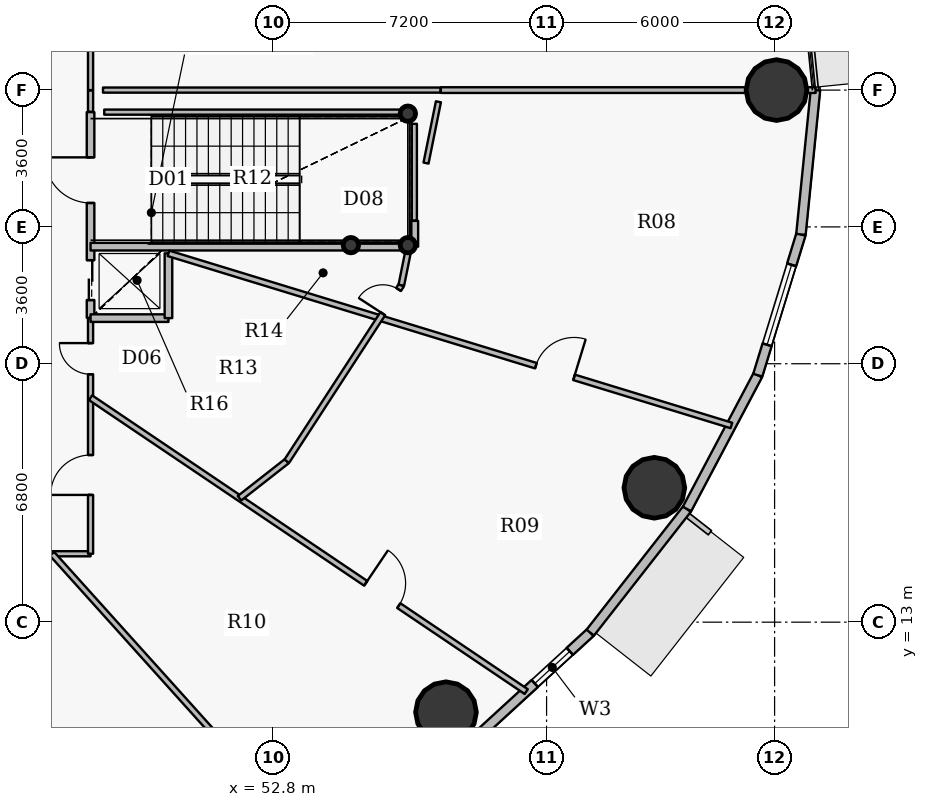
"""IFC4 building model, lengths in metres.
Left out: names, types, materials, properties, quantities, classifications, styles, units other than length and angle.
Written with IfcOpenShell. Run it as: python <this file> out.ifc"""

import sys

from ifc_helpers import new_model, si_unit, direction, frame, frame_2d, origin, origin_2d, place, context, subcontext, project, spatial, rectangle, hollow_circle, extrude, source, transform, mapped, element, fill, save


model = new_model("IFC4")
c1 = context("Model", 3, precision=1e-05, world=origin(), true_north=direction((0.0, 1.0)))
c2 = subcontext(c1, "Body", "Model", "MODEL_VIEW")
j1 = project(units=[si_unit("LENGTHUNIT", "METRE"), si_unit("PLANEANGLEUNIT", "RADIAN")], contexts=[c1])
p1 = place(None, origin())
s1 = spatial("IfcSite", under=j1, at=p1, CompositionType="ELEMENT")
p2 = place(p1, origin())
s2 = spatial("IfcBuilding", under=s1, at=p2, CompositionType="ELEMENT")
p3 = place(p2, frame((0.0, 0.0, 40.8)))
s3 = spatial("IfcBuildingStorey", under=s2, at=p3, CompositionType="ELEMENT", Elevation=40.8)
for number, where, z_axis, x_axis in (
    (1, (56.35, 26.38, 0.0), (0.0, 0.0, 1.0), (1.0, 0.0, 0.0)),
    (2, (56.35, 22.92, 0.0), (0.0, 0.0, 1.0), (1.0, 0.0, 0.0)),
    (3, (54.85, 22.92, 0.0), (0.0, 0.0, 1.0), (1.0, 0.0, 0.0)),
):
    element("IfcColumn", number, at=place(p3, frame(where, z_axis=z_axis, x_axis=x_axis)), inside=s3, PredefinedType="COLUMN", context=c2, shape_type="SweptSolid", body=[
        extrude(hollow_circle(Radius=0.203, WallThickness=0.016, at=origin_2d()), origin(), (0.0, 0.0, 1.0), 4.2),
    ])
for number, where, z_axis, x_axis in (
    (4, (66.05, 27.0, 0.0), (0.0, 0.0, 1.0), (1.0, 0.0, 0.0)),
    (5, (57.353, 10.631, 0.0), (0.0, 0.0, 1.0), (1.0, 0.0, 0.0)),
    (6, (62.835, 16.536, 0.0), (0.0, 0.0, 1.0), (1.0, 0.0, 0.0)),
):
    element("IfcColumn", number, at=place(p3, frame(where, z_axis=z_axis, x_axis=x_axis)), inside=s3, PredefinedType="COLUMN", context=c2, shape_type="SweptSolid", body=[
        extrude(hollow_circle(Radius=0.8, WallThickness=0.045, at=origin_2d()), origin(), (0.0, 0.0, 1.0), 4.2),
    ])
p4 = place(p3, frame((61.15, 12.725, 0.0), z_axis=(0.0, 0.0, 1.0), x_axis=(-0.737116376281, -0.67576582321, 0.0)))
e7 = element("IfcWall", 7, at=p4, inside=s3, PredefinedType="SOLIDWALL", context=c2, shape_type="SweptSolid", body=[
    extrude(rectangle(XDim=4.294, YDim=0.25, at=frame_2d((2.147, 0.0))), origin(), (0.0, 0.0, 1.0), 3.95),
])
p5 = place(p4, frame((0.731, 0.0, 0.9)))
e8 = element("IfcOpeningElement", 8, at=p5, cuts=e7, PredefinedType="OPENING", context=c2, shape_type="SweptSolid", body=[
    extrude(rectangle(XDim=1.25, YDim=1.65, at=origin_2d()), frame((0.625, 0.135, 0.825), z_axis=(0.0, -1.0, 0.0), x_axis=(1.0, 0.0, 0.0)), (0.0, 0.0, 1.0), 0.27),
])
p6 = place(p3, frame((63.695, 15.977, 0.0), z_axis=(0.0, 0.0, 1.0), x_axis=(-0.616295508253, -0.787514981767, 0.0)))
e9 = element("IfcWall", 9, at=p6, inside=s3, PredefinedType="SOLIDWALL", context=c2, shape_type="SweptSolid", body=[
    extrude(rectangle(XDim=4.129, YDim=0.25, at=frame_2d((2.065, 0.0))), origin(), (0.0, 0.0, 1.0), 3.95),
])
p7 = place(p3, frame((65.558, 19.499, 0.0), z_axis=(0.0, 0.0, 1.0), x_axis=(-0.467662443071, -0.883907144072, 0.0)))
e10 = element("IfcWall", 10, at=p7, inside=s3, PredefinedType="SOLIDWALL", context=c2, shape_type="SweptSolid", body=[
    extrude(rectangle(XDim=3.984, YDim=0.25, at=frame_2d((1.992, 0.0))), origin(), (0.0, 0.0, 1.0), 3.95),
])
p8 = place(p3, frame((66.693, 23.203, 0.0), z_axis=(0.0, 0.0, 1.0), x_axis=(-0.293111631758, -0.956078224482, 0.0)))
e11 = element("IfcWall", 11, at=p8, inside=s3, PredefinedType="SOLIDWALL", context=c2, shape_type="SweptSolid", body=[
    extrude(rectangle(XDim=3.875, YDim=0.25, at=frame_2d((1.938, 0.0))), origin(), (0.0, 0.0, 1.0), 3.95),
])
p9 = place(p8, frame((0.837, 0.0, 0.9)))
e12 = element("IfcOpeningElement", 12, at=p9, cuts=e11, PredefinedType="OPENING", context=c2, shape_type="SweptSolid", body=[
    extrude(rectangle(XDim=2.2, YDim=2.0, at=origin_2d()), frame((1.1, 0.135, 1.0), z_axis=(0.0, -1.0, 0.0), x_axis=(1.0, 0.0, 0.0)), (0.0, 0.0, 1.0), 0.27),
])
p10 = place(p3, frame((67.075, 27.0, 0.0), z_axis=(0.0, 0.0, 1.0), x_axis=(-0.099997795174, -0.994987658698, 0.0)))
e13 = element("IfcWall", 13, at=p10, inside=s3, PredefinedType="SOLIDWALL", context=c2, shape_type="SweptSolid", body=[
    extrude(rectangle(XDim=3.816, YDim=0.25, at=frame_2d((1.908, 0.0))), origin(), (0.0, 0.0, 1.0), 3.95),
])
p11 = place(p3, frame((46.05, 14.8, 0.0), z_axis=(0.0, 0.0, 1.0), x_axis=(1.0, 0.0, 0.0)))
e14 = element("IfcWall", 14, at=p11, inside=s3, PredefinedType="PARTITIONING", context=c2, shape_type="SweptSolid", body=[
    extrude(rectangle(XDim=1.95, YDim=0.135, at=frame_2d((0.975, 0.0))), origin(), (0.0, 0.0, 1.0), 3.95),
])
p12 = place(p3, frame((46.985, 14.8, 0.0), z_axis=(0.0, 0.0, 1.0), x_axis=(0.669133664768, -0.743142071662, 0.0)))
e15 = element("IfcWall", 15, at=p12, inside=s3, PredefinedType="PARTITIONING", context=c2, shape_type="SweptSolid", body=[
    extrude(rectangle(XDim=10.299, YDim=0.15, at=frame_2d((5.149, 0.0))), origin(), (0.0, 0.0, 1.0), 3.335),
])
p13 = place(p3, frame((48.0, 14.8, 0.0), z_axis=(0.0, 0.0, 1.0), x_axis=(0.0, 1.0, 0.0)))
e16 = element("IfcWall", 16, at=p13, inside=s3, PredefinedType="PARTITIONING", context=c2, shape_type="SweptSolid", body=[
    extrude(rectangle(XDim=6.2, YDim=0.135, at=frame_2d((3.1, 0.0))), origin(), (0.0, 0.0, 1.0), 3.285),
])
p14 = place(p13, frame((1.548, 0.0, 0.0)))
e17 = element("IfcOpeningElement", 17, at=p14, cuts=e16, PredefinedType="OPENING", context=c2, shape_type="SweptSolid", body=[
    extrude(rectangle(XDim=1.05, YDim=2.15, at=origin_2d()), frame((0.525, 0.078, 1.075), z_axis=(0.0, -1.0, 0.0), x_axis=(1.0, 0.0, 0.0)), (0.0, 0.0, 1.0), 0.155),
])
p15 = place(p13, frame((4.723, 0.0, 0.0)))
e18 = element("IfcOpeningElement", 18, at=p15, cuts=e16, PredefinedType="OPENING", context=c2, shape_type="SweptSolid", body=[
    extrude(rectangle(XDim=0.82, YDim=2.1, at=origin_2d()), frame((0.41, 0.078, 1.05), z_axis=(0.0, -1.0, 0.0), x_axis=(1.0, 0.0, 0.0)), (0.0, 0.0, 1.0), 0.155),
])
p16 = place(p3, frame((48.0, 18.906, 0.0), z_axis=(0.0, 0.0, 1.0), x_axis=(0.829036724814, -0.559194160296, 0.0)))
e19 = element("IfcWall", 19, at=p16, inside=s3, PredefinedType="PARTITIONING", context=c2, shape_type="SweptSolid", body=[
    extrude(rectangle(XDim=13.828, YDim=0.15, at=frame_2d((6.914, 0.0))), origin(), (0.0, 0.0, 1.0), 3.335),
])
p17 = place(p16, frame((8.733, 0.0, 0.0)))
e20 = element("IfcOpeningElement", 20, at=p17, cuts=e19, PredefinedType="OPENING", context=c2, shape_type="SweptSolid", body=[
    extrude(rectangle(XDim=1.05, YDim=2.15, at=origin_2d()), frame((0.525, 0.085, 1.075), z_axis=(0.0, -1.0, 0.0), x_axis=(1.0, 0.0, 0.0)), (0.0, 0.0, 1.0), 0.17),
])
p18 = place(p3, frame((48.0, 21.01, 0.0), z_axis=(0.0, 0.0, 1.0), x_axis=(0.0, 1.0, 0.0)))
e21 = element("IfcWall", 21, at=p18, inside=s3, PredefinedType="PARTITIONING", context=c2, shape_type="SweptSolid", body=[
    extrude(rectangle(XDim=5.41, YDim=0.2, at=frame_2d((2.705, 0.0))), origin(), (0.0, 0.0, 1.0), 3.285),
])
p19 = place(p18, frame((3.02, 0.0, 0.0)))
e22 = element("IfcOpeningElement", 22, at=p19, cuts=e21, PredefinedType="OPENING", context=c2, shape_type="SweptSolid", body=[
    extrude(rectangle(XDim=1.2, YDim=2.15, at=origin_2d()), frame((0.6, 0.11, 1.075), z_axis=(0.0, -1.0, 0.0), x_axis=(1.0, 0.0, 0.0)), (0.0, 0.0, 1.0), 0.22),
])
p20 = place(p18, frame((0.465, 0.0, 0.0)))
e23 = element("IfcOpeningElement", 23, at=p20, cuts=e21, PredefinedType="OPENING", context=c2, shape_type="SweptSolid", body=[
    extrude(rectangle(XDim=1.05, YDim=2.15, at=origin_2d()), frame((0.525, 0.11, 1.075), z_axis=(0.0, -1.0, 0.0), x_axis=(1.0, 0.0, 0.0)), (0.0, 0.0, 1.0), 0.22),
])
p21 = place(p3, frame((48.0, 21.0, 0.0), z_axis=(0.0, 0.0, 1.0), x_axis=(1.0, 0.0, 0.0)))
e24 = element("IfcWall", 24, at=p21, inside=s3, PredefinedType="PARTITIONING", context=c2, shape_type="SweptSolid", body=[
    extrude(rectangle(XDim=2.05, YDim=0.2, at=frame_2d((1.025, 0.0))), origin(), (0.0, 0.0, 1.0), 3.95),
])
p22 = place(p3, frame((48.0, 22.88, 0.0), z_axis=(0.0, 0.0, 1.0), x_axis=(1.0, 0.0, 0.0)))
e25 = element("IfcWall", 25, at=p22, inside=s3, PredefinedType="PARTITIONING", context=c2, shape_type="SweptSolid", body=[
    extrude(rectangle(XDim=8.383, YDim=0.2, at=frame_2d((4.191, 0.0))), origin(), (0.0, 0.0, 1.0), 3.95),
])
p23 = place(p3, frame((48.0, 27.0, 0.0), z_axis=(0.0, 0.0, 1.0), x_axis=(0.0, 1.0, 0.0)))
e26 = element("IfcWall", 26, at=p23, inside=s3, PredefinedType="PARTITIONING", context=c2, shape_type="SweptSolid", body=[
    extrude(rectangle(XDim=14.2, YDim=0.135, at=frame_2d((7.1, 0.0))), origin(), (0.0, 0.0, 1.0), 3.285),
])
p24 = place(p23, frame((2.959, 0.0, 0.0)))
e27 = element("IfcOpeningElement", 27, at=p24, cuts=e26, PredefinedType="OPENING", context=c2, shape_type="SweptSolid", body=[
    extrude(rectangle(XDim=1.05, YDim=2.15, at=origin_2d()), frame((0.525, 0.078, 1.075), z_axis=(0.0, -1.0, 0.0), x_axis=(1.0, 0.0, 0.0)), (0.0, 0.0, 1.0), 0.155),
])
p25 = place(p23, frame((10.019, 0.0, 0.0)))
e28 = element("IfcOpeningElement", 28, at=p25, cuts=e26, PredefinedType="OPENING", context=c2, shape_type="SweptSolid", body=[
    extrude(rectangle(XDim=1.05, YDim=2.15, at=origin_2d()), frame((0.525, 0.078, 1.075), z_axis=(0.0, -1.0, 0.0), x_axis=(1.0, 0.0, 0.0)), (0.0, 0.0, 1.0), 0.155),
])
p26 = place(p3, frame((50.05, 21.0, 0.0), z_axis=(0.0, 0.0, 1.0), x_axis=(0.0, 1.0, 0.0)))
e29 = element("IfcWall", 29, at=p26, inside=s3, PredefinedType="PARTITIONING", context=c2, shape_type="SweptSolid", body=[
    extrude(rectangle(XDim=1.705, YDim=0.2, at=frame_2d((0.852, 0.0))), origin(), (0.0, 0.0, 1.0), 3.285),
])
p27 = place(p3, frame((50.05, 22.705, 0.0), z_axis=(0.0, 0.0, 1.0), x_axis=(0.9563012706, -0.292383104588, 0.0)))
e30 = element("IfcWall", 30, at=p27, inside=s3, PredefinedType="PARTITIONING", context=c2, shape_type="SweptSolid", body=[
    extrude(rectangle(XDim=15.49, YDim=0.15, at=frame_2d((7.745, 0.0))), origin(), (0.0, 0.0, 1.0), 3.335),
])
p28 = place(p27, frame((10.11, 0.0, 0.0)))
e31 = element("IfcOpeningElement", 31, at=p28, cuts=e30, PredefinedType="OPENING", context=c2, shape_type="SweptSolid", body=[
    extrude(rectangle(XDim=1.05, YDim=2.15, at=origin_2d()), frame((0.525, 0.085, 1.075), z_axis=(0.0, -1.0, 0.0), x_axis=(1.0, 0.0, 0.0)), (0.0, 0.0, 1.0), 0.17),
])
p29 = place(p3, frame((51.92, 16.262, 0.0), z_axis=(0.0, 0.0, 1.0), x_axis=(0.787325584525, 0.616537447324, 0.0)))
e32 = element("IfcWall", 32, at=p29, inside=s3, PredefinedType="PARTITIONING", context=c2, shape_type="SweptSolid", body=[
    extrude(rectangle(XDim=1.58, YDim=0.15, at=frame_2d((0.79, 0.0))), origin(), (0.0, 0.0, 1.0), 3.95),
])
p30 = place(p3, frame((53.164, 17.236, 0.0), z_axis=(0.0, 0.0, 1.0), x_axis=(0.545448002944, 0.838144662981, 0.0)))
e33 = element("IfcWall", 33, at=p30, inside=s3, PredefinedType="PARTITIONING", context=c2, shape_type="SweptSolid", body=[
    extrude(rectangle(XDim=5.525, YDim=0.15, at=frame_2d((2.763, 0.0))), origin(), (0.0, 0.0, 1.0), 3.285),
])
p31 = place(p30, frame((4.631, 0.0, 0.0)))
e34 = element("IfcOpeningElement", 34, at=p31, cuts=e33, PredefinedType="OPENING", context=c2, shape_type="SweptSolid", body=[
    extrude(rectangle(XDim=0.76, YDim=2.1, at=origin_2d()), frame((0.38, 0.085, 1.05), z_axis=(0.0, -1.0, 0.0), x_axis=(1.0, 0.0, 0.0)), (0.0, 0.0, 1.0), 0.17),
])
p32 = place(p3, frame((56.178, 21.866, 0.0), z_axis=(0.0, 0.0, 1.0), x_axis=(0.198113758035, 0.980179034094, 0.0)))
e35 = element("IfcWall", 35, at=p32, inside=s3, PredefinedType="PARTITIONING", context=c2, shape_type="SweptSolid", body=[
    extrude(rectangle(XDim=1.034, YDim=0.15, at=frame_2d((0.517, 0.0))), origin(), (0.0, 0.0, 1.0), 3.95),
])
p33 = place(p3, frame((56.52, 22.88, 0.0), z_axis=(0.0, 0.0, 1.0), x_axis=(0.0, 1.0, 0.0)))
e36 = element("IfcWall", 36, at=p33, inside=s3, PredefinedType="PARTITIONING", context=c2, shape_type="SweptSolid", body=[
    extrude(rectangle(XDim=0.679, YDim=0.2, at=frame_2d((0.34, 0.0))), origin(), (0.0, 0.0, 1.0), 3.95),
])
p34 = place(p3, frame((57.216, 27.0, 0.0), z_axis=(0.0, 0.0, 1.0), x_axis=(1.0, 0.0, 0.0)))
e37 = element("IfcWall", 37, at=p34, inside=s3, PredefinedType="PARTITIONING", context=c2, shape_type="SweptSolid", body=[
    extrude(rectangle(XDim=9.864, YDim=0.15, at=frame_2d((4.932, 0.0))), origin(), (0.0, 0.0, 1.0), 3.285),
])
p35 = place(p3, frame((48.36, 26.42, 0.0), z_axis=(0.0, 0.0, 1.0), x_axis=(1.0, 0.0, 0.0)))
e38 = element("IfcWall", 38, at=p35, inside=s3, PredefinedType="PARTITIONING", context=c2, shape_type="SweptSolid", body=[
    extrude(rectangle(XDim=8.16, YDim=0.135, at=frame_2d((4.08, 0.0))), origin(), (0.0, 0.0, 1.0), 3.95),
])
p36 = place(p3, frame((56.52, 26.113, 0.0), z_axis=(0.0, 0.0, 1.0), x_axis=(0.0, -1.0, 0.0)))
e39 = element("IfcWall", 39, at=p36, inside=s3, PredefinedType="PARTITIONING", context=c2, shape_type="SweptSolid", body=[
    extrude(rectangle(XDim=2.543, YDim=0.135, at=frame_2d((1.272, 0.0))), origin(), (0.0, 0.0, 1.0), 3.95),
])
p37 = place(p3, frame((48.0, 26.99, 0.0), z_axis=(0.0, 0.0, 1.0), x_axis=(0.0, -1.0, 0.0)))
e40 = element("IfcWall", 40, at=p37, inside=s3, PredefinedType="PARTITIONING", context=c2, shape_type="SweptSolid", body=[
    extrude(rectangle(XDim=0.56, YDim=0.135, at=frame_2d((0.28, 0.0))), origin(), (0.0, 0.0, 1.0), 3.285),
])
p38 = place(p3, frame((57.206, 27.0, 0.0), z_axis=(0.0, 0.0, 1.0), x_axis=(-1.0, 0.0, 0.0)))
e41 = element("IfcWall", 41, at=p38, inside=s3, PredefinedType="PARTITIONING", context=c2, shape_type="SweptSolid", body=[
    extrude(rectangle(XDim=8.879, YDim=0.135, at=frame_2d((4.439, 0.0))), origin(), (0.0, 0.0, 1.0), 3.285),
])
p39 = place(p3, frame((56.827, 25.079, 0.0), z_axis=(0.0, 0.0, 1.0), x_axis=(0.198340845342, 0.980133107832, 0.0)))
e42 = element("IfcWall", 42, at=p39, inside=s3, PredefinedType="PARTITIONING", context=c2, shape_type="SweptSolid", body=[
    extrude(rectangle(XDim=1.646, YDim=0.135, at=frame_2d((0.823, 0.0))), origin(), (0.0, 0.0, 1.0), 3.95),
])
m1 = source(origin(), c2, "Body", "SweptSolid", [
    extrude(rectangle(XDim=1.25, YDim=1.65, at=origin_2d()), frame((0.625, 0.03, 0.825), z_axis=(0.0, -1.0, 0.0), x_axis=(1.0, 0.0, 0.0)), (0.0, 0.0, 1.0), 0.06),
])
p40 = place(p5, origin())
e43 = element("IfcWindow", 43, at=p40, inside=s3, PartitioningType="SINGLE_PANEL", PredefinedType="WINDOW", context=c2, shape_type="MappedRepresentation", body=[
    mapped(m1, transform((0.0, 0.0, 0.0), x_axis=(1.0, 0.0, 0.0), y_axis=(0.0, 1.0, 0.0), z_axis=(0.0, 0.0, 1.0), scale=1.0)),
])
fill(e8, e43)
m2 = source(origin(), c2, "Body", "SweptSolid", [
    extrude(rectangle(XDim=2.2, YDim=2.0, at=origin_2d()), frame((1.1, 0.03, 1.0), z_axis=(0.0, -1.0, 0.0), x_axis=(1.0, 0.0, 0.0)), (0.0, 0.0, 1.0), 0.06),
])
p41 = place(p9, origin())
e44 = element("IfcWindow", 44, at=p41, inside=s3, PartitioningType="TRIPLE_PANEL_VERTICAL", PredefinedType="WINDOW", context=c2, shape_type="MappedRepresentation", body=[
    mapped(m2, transform((0.0, 0.0, 0.0), x_axis=(1.0, 0.0, 0.0), y_axis=(0.0, 1.0, 0.0), z_axis=(0.0, 0.0, 1.0), scale=1.0)),
])
fill(e12, e44)
m3 = source(origin(), c2, "Body", "SweptSolid", [
    extrude(rectangle(XDim=1.2, YDim=2.15, at=origin_2d()), frame((0.6, 0.025, 1.075), z_axis=(0.0, -1.0, 0.0), x_axis=(1.0, 0.0, 0.0)), (0.0, 0.0, 1.0), 0.05),
])
p42 = place(p19, origin())
e45 = element("IfcDoor", 45, at=p42, inside=s3, OperationType="SINGLE_SWING_RIGHT", PredefinedType="DOOR", context=c2, shape_type="MappedRepresentation", body=[
    mapped(m3, transform((0.0, 0.0, 0.0), x_axis=(1.0, 0.0, 0.0), y_axis=(0.0, 1.0, 0.0), z_axis=(0.0, 0.0, 1.0), scale=1.0)),
])
fill(e22, e45)
m4 = source(origin(), c2, "Body", "SweptSolid", [
    extrude(rectangle(XDim=1.05, YDim=2.15, at=origin_2d()), frame((0.525, 0.025, 1.075), z_axis=(0.0, -1.0, 0.0), x_axis=(1.0, 0.0, 0.0)), (0.0, 0.0, 1.0), 0.05),
])
p43 = place(p20, origin())
e46 = element("IfcDoor", 46, at=p43, inside=s3, OperationType="DOUBLE_DOOR_SLIDING", PredefinedType="USERDEFINED", context=c2, shape_type="MappedRepresentation", body=[
    mapped(m4, transform((0.0, 0.0, 0.0), x_axis=(1.0, 0.0, 0.0), y_axis=(0.0, 1.0, 0.0), z_axis=(0.0, 0.0, 1.0), scale=1.0)),
])
fill(e23, e46)
m5 = source(origin(), c2, "Body", "SweptSolid", [
    extrude(rectangle(XDim=1.05, YDim=2.15, at=origin_2d()), frame((0.525, 0.025, 1.075), z_axis=(0.0, -1.0, 0.0), x_axis=(1.0, 0.0, 0.0)), (0.0, 0.0, 1.0), 0.05),
])
p44 = place(p14, origin())
e47 = element("IfcDoor", 47, at=p44, inside=s3, OperationType="SINGLE_SWING_LEFT", PredefinedType="DOOR", context=c2, shape_type="MappedRepresentation", body=[
    mapped(m5, transform((0.0, 0.0, 0.0), x_axis=(1.0, 0.0, 0.0), y_axis=(0.0, 1.0, 0.0), z_axis=(0.0, 0.0, 1.0), scale=1.0)),
])
fill(e17, e47)
m6 = source(origin(), c2, "Body", "SweptSolid", [
    extrude(rectangle(XDim=0.82, YDim=2.1, at=origin_2d()), frame((0.41, 0.025, 1.05), z_axis=(0.0, -1.0, 0.0), x_axis=(1.0, 0.0, 0.0)), (0.0, 0.0, 1.0), 0.05),
])
p45 = place(p15, origin())
e48 = element("IfcDoor", 48, at=p45, inside=s3, OperationType="SINGLE_SWING_RIGHT", PredefinedType="DOOR", context=c2, shape_type="MappedRepresentation", body=[
    mapped(m6, transform((0.0, 0.0, 0.0), x_axis=(1.0, 0.0, 0.0), y_axis=(0.0, 1.0, 0.0), z_axis=(0.0, 0.0, 1.0), scale=1.0)),
])
fill(e18, e48)
p46 = place(p17, origin())
e49 = element("IfcDoor", 49, at=p46, inside=s3, OperationType="SINGLE_SWING_LEFT", PredefinedType="DOOR", context=c2, shape_type="MappedRepresentation", body=[
    mapped(m5, transform((0.0, 0.0, 0.0), x_axis=(1.0, 0.0, 0.0), y_axis=(0.0, 1.0, 0.0), z_axis=(0.0, 0.0, 1.0), scale=1.0)),
])
fill(e20, e49)
p47 = place(p28, origin())
e50 = element("IfcDoor", 50, at=p47, inside=s3, OperationType="SINGLE_SWING_RIGHT", PredefinedType="DOOR", context=c2, shape_type="MappedRepresentation", body=[
    mapped(m5, transform((0.0, 0.0, 0.0), x_axis=(1.0, 0.0, 0.0), y_axis=(0.0, 1.0, 0.0), z_axis=(0.0, 0.0, 1.0), scale=1.0)),
])
fill(e31, e50)
m7 = source(origin(), c2, "Body", "SweptSolid", [
    extrude(rectangle(XDim=0.76, YDim=2.1, at=origin_2d()), frame((0.38, 0.025, 1.05), z_axis=(0.0, -1.0, 0.0), x_axis=(1.0, 0.0, 0.0)), (0.0, 0.0, 1.0), 0.05),
])
p48 = place(p31, origin())
e51 = element("IfcDoor", 51, at=p48, inside=s3, OperationType="SINGLE_SWING_LEFT", PredefinedType="DOOR", context=c2, shape_type="MappedRepresentation", body=[
    mapped(m7, transform((0.0, 0.0, 0.0), x_axis=(1.0, 0.0, 0.0), y_axis=(0.0, 1.0, 0.0), z_axis=(0.0, 0.0, 1.0), scale=1.0)),
])
fill(e34, e51)
save(model, sys.argv[1])
